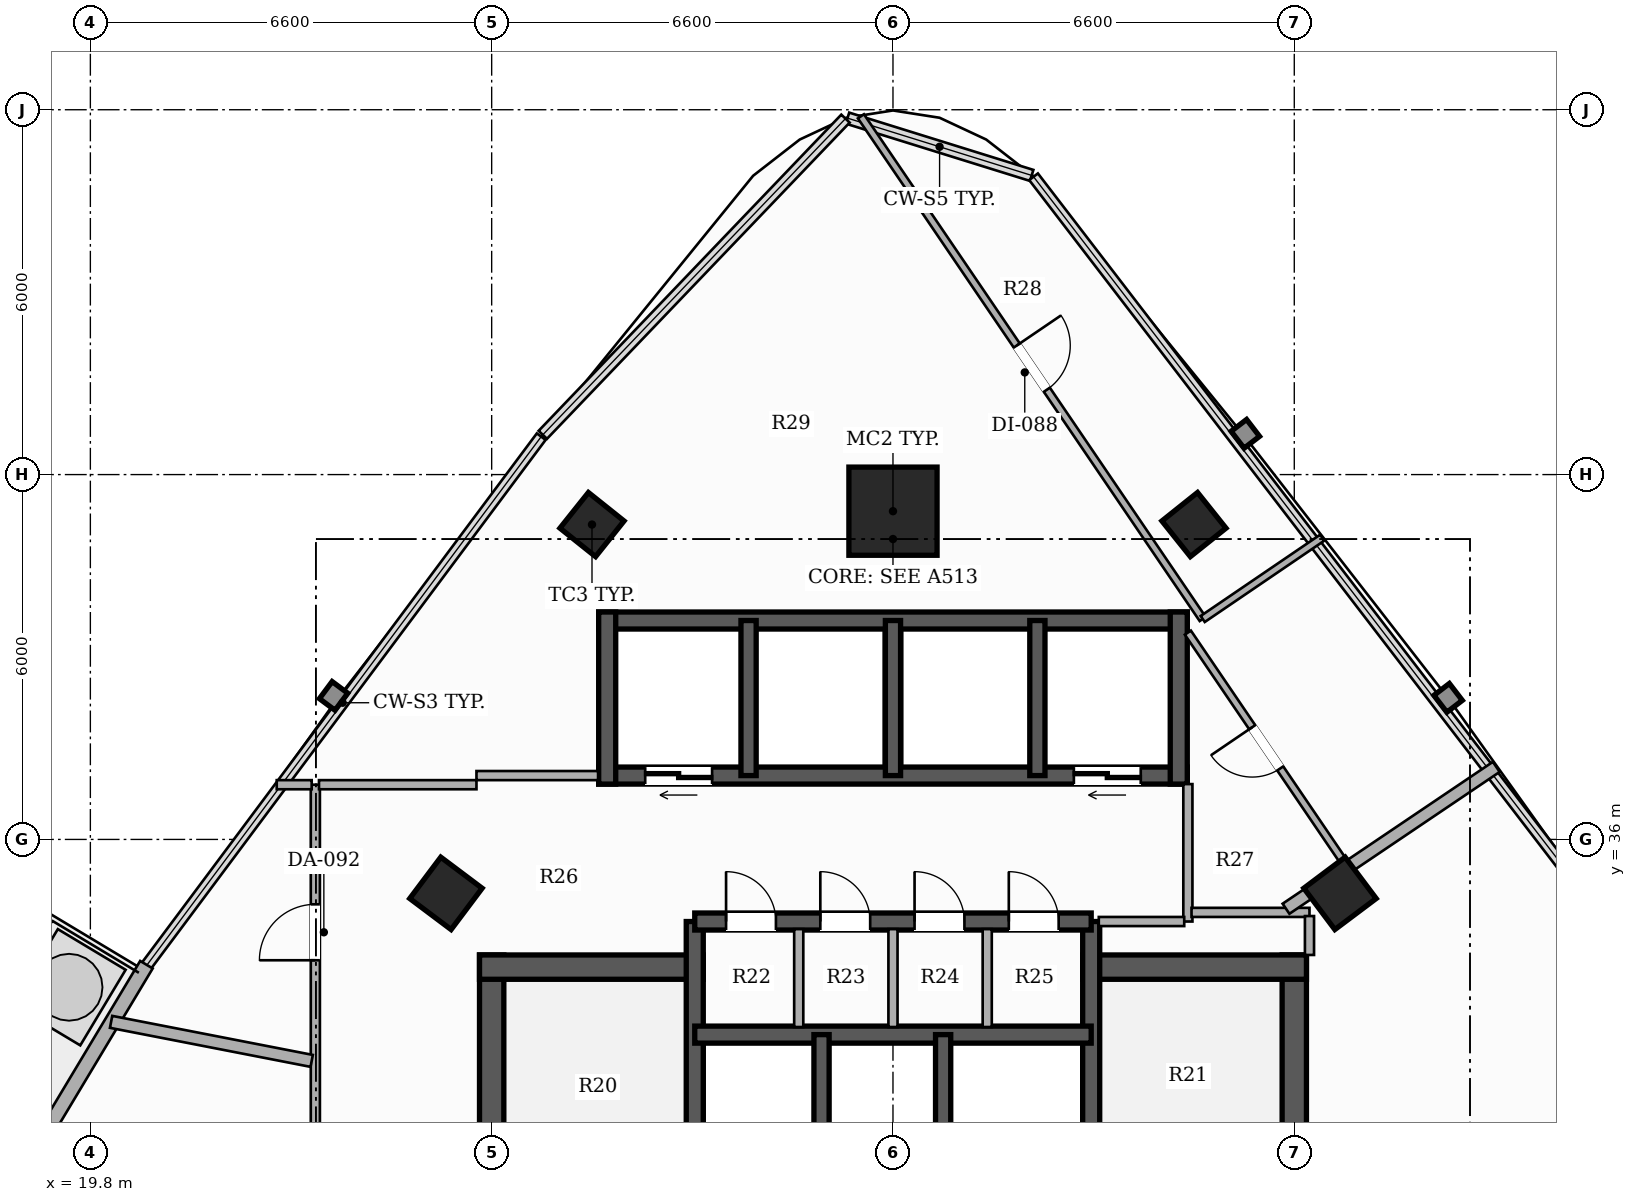
"""IFC4 building model, lengths in metres.
Left out: names, types, materials, properties, quantities, classifications, styles, units other than length and angle.
Written with IfcOpenShell. Run it as: python <this file> out.ifc"""

import sys

from ifc_helpers import new_model, si_unit, direction, frame, frame_2d, origin, origin_2d, place, context, subcontext, project, spatial, rectangle, hollow_rectangle, extrude, element, fill, save


model = new_model("IFC4")
c1 = context("Model", 3, precision=1e-05, world=origin(), true_north=direction((0.0, 1.0)))
c2 = subcontext(c1, "Body", "Model", "MODEL_VIEW")
j1 = project(units=[si_unit("LENGTHUNIT", "METRE"), si_unit("PLANEANGLEUNIT", "RADIAN")], contexts=[c1])
p1 = place(None, origin())
s1 = spatial("IfcSite", under=j1, at=p1, CompositionType="ELEMENT")
p2 = place(p1, origin())
s2 = spatial("IfcBuilding", under=s1, at=p2, CompositionType="ELEMENT")
p3 = place(p2, frame((0.0, 0.0, 160.55)))
s3 = spatial("IfcBuildingStorey", under=s2, at=p3, CompositionType="ELEMENT", Elevation=160.55)
p4 = place(p3, frame((26.4, 26.5, 0.0), z_axis=(0.0, 0.0, 1.0), x_axis=(0.0, 1.0, 0.0)))
e1 = element("IfcWall", 1, at=p4, inside=s3, PredefinedType="SHEAR", context=c2, shape_type="SweptSolid", body=[
    extrude(rectangle(XDim=7.6, YDim=0.4, at=frame_2d((3.8, 0.0))), origin(), (0.0, 0.0, 1.0), 3.3),
])
p5 = place(p3, frame((26.2, 33.9, 0.0), z_axis=(0.0, 0.0, 1.0), x_axis=(1.0, 0.0, 0.0)))
e2 = element("IfcWall", 2, at=p5, inside=s3, PredefinedType="SHEAR", context=c2, shape_type="SweptSolid", body=[
    extrude(rectangle(XDim=3.68, YDim=0.4, at=frame_2d((1.84, 0.0))), origin(), (0.0, 0.0, 1.0), 3.3),
])
p6 = place(p3, frame((39.6, 26.5, 0.0), z_axis=(0.0, 0.0, 1.0), x_axis=(0.0, 1.0, 0.0)))
e3 = element("IfcWall", 3, at=p6, inside=s3, PredefinedType="SHEAR", context=c2, shape_type="SweptSolid", body=[
    extrude(rectangle(XDim=7.6, YDim=0.4, at=frame_2d((3.8, 0.0))), origin(), (0.0, 0.0, 1.0), 3.3),
])
p7 = place(p3, frame((36.12, 33.9, 0.0), z_axis=(0.0, 0.0, 1.0), x_axis=(1.0, 0.0, 0.0)))
e4 = element("IfcWall", 4, at=p7, inside=s3, PredefinedType="SHEAR", context=c2, shape_type="SweptSolid", body=[
    extrude(rectangle(XDim=3.68, YDim=0.4, at=frame_2d((1.84, 0.0))), origin(), (0.0, 0.0, 1.0), 3.3),
])
p8 = place(p3, frame((29.74, 26.5, 0.0), z_axis=(0.0, 0.0, 1.0), x_axis=(0.0, 1.0, 0.0)))
e5 = element("IfcWall", 5, at=p8, inside=s3, PredefinedType="SHEAR", context=c2, shape_type="SweptSolid", body=[
    extrude(rectangle(XDim=8.15, YDim=0.28, at=frame_2d((4.075, 0.0))), origin(), (0.0, 0.0, 1.0), 3.3),
])
p9 = place(p8, frame((0.6, 0.0, 0.0)))
e6 = element("IfcOpeningElement", 6, at=p9, cuts=e5, PredefinedType="OPENING", context=c2, shape_type="SweptSolid", body=[
    extrude(rectangle(XDim=1.05, YDim=2.15, at=frame_2d((0.525, 1.075))), frame((0.0, 0.15, 0.0), z_axis=(0.0, -1.0, 0.0), x_axis=(1.0, 0.0, 0.0)), (0.0, 0.0, 1.0), 0.3),
])
p10 = place(p3, frame((36.26, 26.5, 0.0), z_axis=(0.0, 0.0, 1.0), x_axis=(0.0, 1.0, 0.0)))
e7 = element("IfcWall", 7, at=p10, inside=s3, PredefinedType="SHEAR", context=c2, shape_type="SweptSolid", body=[
    extrude(rectangle(XDim=8.15, YDim=0.28, at=frame_2d((4.075, 0.0))), origin(), (0.0, 0.0, 1.0), 3.3),
])
p11 = place(p10, frame((0.6, 0.0, 0.0)))
e8 = element("IfcOpeningElement", 8, at=p11, cuts=e7, PredefinedType="OPENING", context=c2, shape_type="SweptSolid", body=[
    extrude(rectangle(XDim=1.05, YDim=2.15, at=frame_2d((0.525, 1.075))), frame((0.0, 0.15, 0.0), z_axis=(0.0, -1.0, 0.0), x_axis=(1.0, 0.0, 0.0)), (0.0, 0.0, 1.0), 0.3),
])
p12 = place(p3, frame((29.74, 32.79, 0.0), z_axis=(0.0, 0.0, 1.0), x_axis=(1.0, 0.0, 0.0)))
e9 = element("IfcWall", 9, at=p12, inside=s3, PredefinedType="SHEAR", context=c2, shape_type="SweptSolid", body=[
    extrude(rectangle(XDim=6.52, YDim=0.28, at=frame_2d((3.26, 0.0))), origin(), (0.0, 0.0, 1.0), 3.3),
])
for number, where, z_axis, x_axis in (
    (10, (31.825, 29.89, 0.0), (0.0, 0.0, 1.0), (0.0, 1.0, 0.0)),
    (11, (33.825, 29.89, 0.0), (0.0, 0.0, 1.0), (0.0, 1.0, 0.0)),
):
    element("IfcWall", number, at=place(p3, frame(where, z_axis=z_axis, x_axis=x_axis)), inside=s3, PredefinedType="SHEAR", context=c2, shape_type="SweptSolid", body=[
        extrude(rectangle(XDim=2.9, YDim=0.25, at=frame_2d((1.45, 0.0))), origin(), (0.0, 0.0, 1.0), 3.3),
    ])
p13 = place(p3, frame((29.74, 34.65, 0.0), z_axis=(0.0, 0.0, 1.0), x_axis=(1.0, 0.0, 0.0)))
e12 = element("IfcWall", 12, at=p13, inside=s3, PredefinedType="SHEAR", context=c2, shape_type="SweptSolid", body=[
    extrude(rectangle(XDim=6.52, YDim=0.28, at=frame_2d((3.26, 0.0))), origin(), (0.0, 0.0, 1.0), 3.3),
])
p14 = place(p13, frame((0.515, 0.0, 0.0)))
e13 = element("IfcOpeningElement", 13, at=p14, cuts=e12, PredefinedType="OPENING", context=c2, shape_type="SweptSolid", body=[
    extrude(rectangle(XDim=0.82, YDim=2.1, at=frame_2d((0.41, 1.05))), frame((0.0, 0.15, 0.0), z_axis=(0.0, -1.0, 0.0), x_axis=(1.0, 0.0, 0.0)), (0.0, 0.0, 1.0), 0.3),
])
p15 = place(p13, frame((2.065, 0.0, 0.0)))
e14 = element("IfcOpeningElement", 14, at=p15, cuts=e12, PredefinedType="OPENING", context=c2, shape_type="SweptSolid", body=[
    extrude(rectangle(XDim=0.82, YDim=2.1, at=frame_2d((0.41, 1.05))), frame((0.0, 0.15, 0.0), z_axis=(0.0, -1.0, 0.0), x_axis=(1.0, 0.0, 0.0)), (0.0, 0.0, 1.0), 0.3),
])
p16 = place(p13, frame((3.615, 0.0, 0.0)))
e15 = element("IfcOpeningElement", 15, at=p16, cuts=e12, PredefinedType="OPENING", context=c2, shape_type="SweptSolid", body=[
    extrude(rectangle(XDim=0.82, YDim=2.1, at=frame_2d((0.41, 1.05))), frame((0.0, 0.15, 0.0), z_axis=(0.0, -1.0, 0.0), x_axis=(1.0, 0.0, 0.0)), (0.0, 0.0, 1.0), 0.3),
])
p17 = place(p13, frame((5.165, 0.0, 0.0)))
e16 = element("IfcOpeningElement", 16, at=p17, cuts=e12, PredefinedType="OPENING", context=c2, shape_type="SweptSolid", body=[
    extrude(rectangle(XDim=0.82, YDim=2.1, at=frame_2d((0.41, 1.05))), frame((0.0, 0.15, 0.0), z_axis=(0.0, -1.0, 0.0), x_axis=(1.0, 0.0, 0.0)), (0.0, 0.0, 1.0), 0.3),
])
p18 = place(p3, frame((37.84, 37.05, 0.0), z_axis=(0.0, 0.0, 1.0), x_axis=(-1.0, 0.0, 0.0)))
e17 = element("IfcWall", 17, at=p18, inside=s3, PredefinedType="SHEAR", context=c2, shape_type="SweptSolid", body=[
    extrude(rectangle(XDim=9.68, YDim=0.28, at=frame_2d((4.84, 0.0))), origin(), (0.0, 0.0, 1.0), 3.3),
])
p19 = place(p18, frame((7.815, 0.0, 0.0)))
e18 = element("IfcOpeningElement", 18, at=p19, cuts=e17, PredefinedType="OPENING", context=c2, shape_type="SweptSolid", body=[
    extrude(rectangle(XDim=1.1, YDim=2.2, at=frame_2d((0.55, 1.1))), frame((0.0, 0.15, 0.0), z_axis=(0.0, -1.0, 0.0), x_axis=(1.0, 0.0, 0.0)), (0.0, 0.0, 1.0), 0.3),
])
p20 = place(p18, frame((0.765, 0.0, 0.0)))
e19 = element("IfcOpeningElement", 19, at=p20, cuts=e17, PredefinedType="OPENING", context=c2, shape_type="SweptSolid", body=[
    extrude(rectangle(XDim=1.1, YDim=2.2, at=frame_2d((0.55, 1.1))), frame((0.0, 0.15, 0.0), z_axis=(0.0, -1.0, 0.0), x_axis=(1.0, 0.0, 0.0)), (0.0, 0.0, 1.0), 0.3),
])
p21 = place(p3, frame((28.16, 39.6, 0.0), z_axis=(0.0, 0.0, 1.0), x_axis=(1.0, 0.0, 0.0)))
e20 = element("IfcWall", 20, at=p21, inside=s3, PredefinedType="SHEAR", context=c2, shape_type="SweptSolid", body=[
    extrude(rectangle(XDim=9.68, YDim=0.28, at=frame_2d((4.84, 0.0))), origin(), (0.0, 0.0, 1.0), 3.3),
])
for number, where, z_axis, x_axis in (
    (21, (28.3, 36.91, 0.0), (0.0, 0.0, 1.0), (0.0, 1.0, 0.0)),
    (22, (37.7, 36.91, 0.0), (0.0, 0.0, 1.0), (0.0, 1.0, 0.0)),
):
    element("IfcWall", number, at=place(p3, frame(where, z_axis=z_axis, x_axis=x_axis)), inside=s3, PredefinedType="SHEAR", context=c2, shape_type="SweptSolid", body=[
        extrude(rectangle(XDim=2.83, YDim=0.28, at=frame_2d((1.415, 0.0))), origin(), (0.0, 0.0, 1.0), 3.3),
    ])
for number, where, z_axis, x_axis in (
    (23, (30.625, 37.05, 0.0), (0.0, 0.0, 1.0), (0.0, 1.0, 0.0)),
    (24, (33.0, 37.05, 0.0), (0.0, 0.0, 1.0), (0.0, 1.0, 0.0)),
    (25, (35.375, 37.05, 0.0), (0.0, 0.0, 1.0), (0.0, 1.0, 0.0)),
):
    element("IfcWall", number, at=place(p3, frame(where, z_axis=z_axis, x_axis=x_axis)), inside=s3, PredefinedType="SHEAR", context=c2, shape_type="SweptSolid", body=[
        extrude(rectangle(XDim=2.55, YDim=0.25, at=frame_2d((1.275, 0.0))), origin(), (0.0, 0.0, 1.0), 3.3),
    ])
p22 = place(p3, frame((33.0, 41.398, 0.0), z_axis=(0.0, 0.0, 1.0), x_axis=(1.0, 0.0, 0.0)))
e26 = element("IfcColumn", 26, at=p22, inside=s3, PredefinedType="COLUMN", context=c2, shape_type="SweptSolid", body=[
    extrude(hollow_rectangle(XDim=1.45, YDim=1.45, WallThickness=0.045, at=origin_2d()), origin(), (0.0, 0.0, 1.0), 3.3),
])
for number, where, z_axis, x_axis in (
    (27, (25.648, 35.113, 0.0), (0.0, 0.0, 1.0), (0.6, 0.8, 0.0)),
    (28, (40.352, 35.113, 0.0), (0.0, 0.0, 1.0), (-0.6, 0.8, 0.0)),
):
    element("IfcColumn", number, at=place(p3, frame(where, z_axis=z_axis, x_axis=x_axis)), inside=s3, PredefinedType="COLUMN", context=c2, shape_type="SweptSolid", body=[
        extrude(hollow_rectangle(XDim=0.85, YDim=0.85, WallThickness=0.028, at=origin_2d()), origin(), (0.0, 0.0, 1.0), 3.3),
    ])
for number, where, z_axis, x_axis in (
    (29, (28.05, 41.178, 0.0), (0.0, 0.0, 1.0), (0.624, 0.782, 0.0)),
    (30, (37.95, 41.178, 0.0), (0.0, 0.0, 1.0), (-0.624, 0.782, 0.0)),
):
    element("IfcColumn", number, at=place(p3, frame(where, z_axis=z_axis, x_axis=x_axis)), inside=s3, PredefinedType="COLUMN", context=c2, shape_type="SweptSolid", body=[
        extrude(hollow_rectangle(XDim=0.75, YDim=0.75, WallThickness=0.025, at=origin_2d()), origin(), (0.0, 0.0, 1.0), 3.3),
    ])
p23 = place(p3, frame((20.722, 33.94, 0.0), z_axis=(0.0, 0.0, 1.0), x_axis=(-0.514334017412, -0.85758994778, 0.0)))
e31 = element("IfcWall", 31, at=p23, inside=s3, PredefinedType="SOLIDWALL", context=c2, shape_type="SweptSolid", body=[
    extrude(rectangle(XDim=11.1, YDim=0.24, at=frame_2d((5.55, 0.0))), origin(), (0.0, 0.0, 1.0), 2.624),
])
p24 = place(p23, frame((8.602, 0.0, 0.0)))
e32 = element("IfcOpeningElement", 32, at=p24, cuts=e31, PredefinedType="OPENING", context=c2, shape_type="SweptSolid", body=[
    extrude(rectangle(XDim=1.8, YDim=2.2, at=frame_2d((0.9, 1.1))), frame((0.0, 0.13, 0.0), z_axis=(0.0, -1.0, 0.0), x_axis=(1.0, 0.0, 0.0)), (0.0, 0.0, 1.0), 0.26),
])
p25 = place(p3, frame((37.85, 34.65, 0.0), z_axis=(0.0, 0.0, 1.0), x_axis=(0.0, 1.0, 0.0)))
e33 = element("IfcWall", 33, at=p25, inside=s3, PredefinedType="PARTITIONING", context=c2, shape_type="SweptSolid", body=[
    extrude(rectangle(XDim=2.26, YDim=0.15, at=frame_2d((1.13, 0.0))), origin(), (0.0, 0.0, 1.0), 3.06),
])
p26 = place(p3, frame((36.385, 34.65, 0.0), z_axis=(0.0, 0.0, 1.0), x_axis=(1.0, 0.0, 0.0)))
e34 = element("IfcWall", 34, at=p26, inside=s3, PredefinedType="PARTITIONING", context=c2, shape_type="SweptSolid", body=[
    extrude(rectangle(XDim=1.405, YDim=0.15, at=frame_2d((0.703, 0.0))), origin(), (0.0, 0.0, 1.0), 2.425),
])
for number, where, z_axis, x_axis in (
    (35, (31.45, 32.915, 0.0), (0.0, 0.0, 1.0), (0.0, 1.0, 0.0)),
    (36, (33.0, 32.915, 0.0), (0.0, 0.0, 1.0), (0.0, 1.0, 0.0)),
    (37, (34.55, 32.915, 0.0), (0.0, 0.0, 1.0), (0.0, 1.0, 0.0)),
):
    element("IfcWall", number, at=place(p3, frame(where, z_axis=z_axis, x_axis=x_axis)), inside=s3, PredefinedType="PARTITIONING", context=c2, shape_type="SweptSolid", body=[
        extrude(rectangle(XDim=1.61, YDim=0.15, at=frame_2d((0.805, 0.0))), origin(), (0.0, 0.0, 1.0), 3.06),
    ])
p27 = place(p3, frame((23.5, 14.06, 0.0), z_axis=(0.0, 0.0, 1.0), x_axis=(0.0, 1.0, 0.0)))
e38 = element("IfcWall", 38, at=p27, inside=s3, PredefinedType="PARTITIONING", context=c2, shape_type="SweptSolid", body=[
    extrude(rectangle(XDim=22.84, YDim=0.15, at=frame_2d((11.42, 0.0))), origin(), (0.0, 0.0, 1.0), 2.413),
])
p28 = place(p27, frame((4.064, 0.0, 0.0)))
e39 = element("IfcOpeningElement", 39, at=p28, cuts=e38, PredefinedType="OPENING", context=c2, shape_type="SweptSolid", body=[
    extrude(rectangle(XDim=0.92, YDim=2.15, at=frame_2d((0.46, 1.075))), frame((0.0, 0.085, 0.0), z_axis=(0.0, -1.0, 0.0), x_axis=(1.0, 0.0, 0.0)), (0.0, 0.0, 1.0), 0.17),
])
p29 = place(p27, frame((13.047, 0.0, 0.0)))
e40 = element("IfcOpeningElement", 40, at=p29, cuts=e38, PredefinedType="OPENING", context=c2, shape_type="SweptSolid", body=[
    extrude(rectangle(XDim=0.88, YDim=2.1, at=frame_2d((0.44, 1.05))), frame((0.0, 0.085, 0.0), z_axis=(0.0, -1.0, 0.0), x_axis=(1.0, 0.0, 0.0)), (0.0, 0.0, 1.0), 0.17),
])
p30 = place(p27, frame((19.953, 0.0, 0.0)))
e41 = element("IfcOpeningElement", 41, at=p30, cuts=e38, PredefinedType="OPENING", context=c2, shape_type="SweptSolid", body=[
    extrude(rectangle(XDim=0.92, YDim=2.15, at=frame_2d((0.46, 1.075))), frame((0.0, 0.085, 0.0), z_axis=(0.0, -1.0, 0.0), x_axis=(1.0, 0.0, 0.0)), (0.0, 0.0, 1.0), 0.17),
])
p31 = place(p3, frame((22.865, 36.9, 0.0), z_axis=(0.0, 0.0, 1.0), x_axis=(1.0, 0.0, 0.0)))
e42 = element("IfcWall", 42, at=p31, inside=s3, PredefinedType="PARTITIONING", context=c2, shape_type="SweptSolid", body=[
    extrude(rectangle(XDim=0.575, YDim=0.15, at=frame_2d((0.288, 0.0))), origin(), (0.0, 0.0, 1.0), 3.06),
])
p32 = place(p3, frame((23.56, 36.9, 0.0), z_axis=(0.0, 0.0, 1.0), x_axis=(1.0, 0.0, 0.0)))
e43 = element("IfcWall", 43, at=p32, inside=s3, PredefinedType="PARTITIONING", context=c2, shape_type="SweptSolid", body=[
    extrude(rectangle(XDim=2.59, YDim=0.15, at=frame_2d((1.295, 0.0))), origin(), (0.0, 0.0, 1.0), 2.413),
])
p33 = place(p3, frame((26.15, 37.05, 0.0), z_axis=(0.0, 0.0, 1.0), x_axis=(1.0, 0.0, 0.0)))
e44 = element("IfcWall", 44, at=p33, inside=s3, PredefinedType="PARTITIONING", context=c2, shape_type="SweptSolid", body=[
    extrude(rectangle(XDim=2.0, YDim=0.15, at=frame_2d((1.0, 0.0))), origin(), (0.0, 0.0, 1.0), 2.413),
])
p34 = place(p3, frame((37.91, 34.8, 0.0), z_axis=(0.0, 0.0, 1.0), x_axis=(1.0, 0.0, 0.0)))
e45 = element("IfcWall", 45, at=p34, inside=s3, PredefinedType="PARTITIONING", context=c2, shape_type="SweptSolid", body=[
    extrude(rectangle(XDim=1.94, YDim=0.15, at=frame_2d((0.97, 0.0))), origin(), (0.0, 0.0, 1.0), 2.721),
])
p35 = place(p3, frame((39.85, 34.74, 0.0), z_axis=(0.0, 0.0, 1.0), x_axis=(0.0, -1.0, 0.0)))
e46 = element("IfcWall", 46, at=p35, inside=s3, PredefinedType="PARTITIONING", context=c2, shape_type="SweptSolid", body=[
    extrude(rectangle(XDim=0.64, YDim=0.15, at=frame_2d((0.32, 0.0))), origin(), (0.0, 0.0, 1.0), 2.721),
])
p36 = place(p3, frame((39.464, 34.86, 0.0), z_axis=(0.0, 0.0, 1.0), x_axis=(0.828976210701, 0.559283865395, 0.0)))
e47 = element("IfcWall", 47, at=p36, inside=s3, PredefinedType="PARTITIONING", context=c2, shape_type="SweptSolid", body=[
    extrude(rectangle(XDim=4.171, YDim=0.2, at=frame_2d((2.086, 0.0))), origin(), (0.0, 0.0, 1.0), 2.413),
])
p37 = place(p3, frame((20.141, 33.0, 0.0), z_axis=(0.0, 0.0, 1.0), x_axis=(0.981579076432, -0.191056318163, 0.0)))
e48 = element("IfcWall", 48, at=p37, inside=s3, PredefinedType="PARTITIONING", context=c2, shape_type="SweptSolid", body=[
    extrude(rectangle(XDim=3.361, YDim=0.2, at=frame_2d((1.68, 0.0))), origin(), (0.0, 0.0, 1.0), 2.413),
])
p38 = place(p3, frame((40.427, 35.612, 0.0), z_axis=(0.0, 0.0, 1.0), x_axis=(-0.562385802303, 0.826874965982, 0.0)))
e49 = element("IfcWall", 49, at=p38, inside=s3, PredefinedType="PARTITIONING", context=c2, shape_type="SweptSolid", body=[
    extrude(rectangle(XDim=4.582, YDim=0.12, at=frame_2d((2.291, 0.0))), origin(), (0.0, 0.0, 1.0), 2.413),
])
p39 = place(p38, frame((1.881, 0.0, 0.0)))
e50 = element("IfcOpeningElement", 50, at=p39, cuts=e49, PredefinedType="OPENING", context=c2, shape_type="SweptSolid", body=[
    extrude(rectangle(XDim=0.82, YDim=2.1, at=frame_2d((0.41, 1.05))), frame((0.0, 0.07, 0.0), z_axis=(0.0, -1.0, 0.0), x_axis=(1.0, 0.0, 0.0)), (0.0, 0.0, 1.0), 0.14),
])
p40 = place(p3, frame((32.473, 47.892, 0.0), z_axis=(0.0, 0.0, 1.0), x_axis=(0.562273950157, -0.826951029369, 0.0)))
e51 = element("IfcWall", 51, at=p40, inside=s3, PredefinedType="PARTITIONING", context=c2, shape_type="SweptSolid", body=[
    extrude(rectangle(XDim=9.997, YDim=0.12, at=frame_2d((4.999, 0.0))), origin(), (0.0, 0.0, 1.0), 2.413),
])
p41 = place(p40, frame((4.558, 0.0, 0.0)))
e52 = element("IfcOpeningElement", 52, at=p41, cuts=e51, PredefinedType="OPENING", context=c2, shape_type="SweptSolid", body=[
    extrude(rectangle(XDim=0.88, YDim=2.1, at=frame_2d((0.44, 1.05))), frame((0.0, 0.07, 0.0), z_axis=(0.0, -1.0, 0.0), x_axis=(1.0, 0.0, 0.0)), (0.0, 0.0, 1.0), 0.14),
])
p42 = place(p3, frame((38.094, 39.625, 0.0), z_axis=(0.0, 0.0, 1.0), x_axis=(0.826798473187, 0.562498253096, 0.0)))
e53 = element("IfcWall", 53, at=p42, inside=s3, PredefinedType="PARTITIONING", context=c2, shape_type="SweptSolid", body=[
    extrude(rectangle(XDim=2.377, YDim=0.12, at=frame_2d((1.188, 0.0))), origin(), (0.0, 0.0, 1.0), 2.413),
])
p43 = place(p19, origin())
e54 = element("IfcDoor", 54, at=p43, inside=s3, OperationType="DOUBLE_DOOR_SLIDING", PredefinedType="DOOR", context=c2, shape_type="SweptSolid", body=[
    extrude(rectangle(XDim=1.1, YDim=2.2, at=frame_2d((0.55, 1.1))), frame((0.0, 0.025, 0.0), z_axis=(0.0, -1.0, 0.0), x_axis=(1.0, 0.0, 0.0)), (0.0, 0.0, 1.0), 0.05),
])
fill(e18, e54)
p44 = place(p20, origin())
e55 = element("IfcDoor", 55, at=p44, inside=s3, OperationType="DOUBLE_DOOR_SLIDING", PredefinedType="DOOR", context=c2, shape_type="SweptSolid", body=[
    extrude(rectangle(XDim=1.1, YDim=2.2, at=frame_2d((0.55, 1.1))), frame((0.0, 0.025, 0.0), z_axis=(0.0, -1.0, 0.0), x_axis=(1.0, 0.0, 0.0)), (0.0, 0.0, 1.0), 0.05),
])
fill(e19, e55)
p45 = place(p14, origin())
e56 = element("IfcDoor", 56, at=p45, inside=s3, OperationType="SINGLE_SWING_LEFT", PredefinedType="DOOR", context=c2, shape_type="SweptSolid", body=[
    extrude(rectangle(XDim=0.82, YDim=2.1, at=frame_2d((0.41, 1.05))), frame((0.0, 0.025, 0.0), z_axis=(0.0, -1.0, 0.0), x_axis=(1.0, 0.0, 0.0)), (0.0, 0.0, 1.0), 0.05),
])
fill(e13, e56)
p46 = place(p15, origin())
e57 = element("IfcDoor", 57, at=p46, inside=s3, OperationType="SINGLE_SWING_LEFT", PredefinedType="DOOR", context=c2, shape_type="SweptSolid", body=[
    extrude(rectangle(XDim=0.82, YDim=2.1, at=frame_2d((0.41, 1.05))), frame((0.0, 0.025, 0.0), z_axis=(0.0, -1.0, 0.0), x_axis=(1.0, 0.0, 0.0)), (0.0, 0.0, 1.0), 0.05),
])
fill(e14, e57)
p47 = place(p16, origin())
e58 = element("IfcDoor", 58, at=p47, inside=s3, OperationType="SINGLE_SWING_LEFT", PredefinedType="DOOR", context=c2, shape_type="SweptSolid", body=[
    extrude(rectangle(XDim=0.82, YDim=2.1, at=frame_2d((0.41, 1.05))), frame((0.0, 0.025, 0.0), z_axis=(0.0, -1.0, 0.0), x_axis=(1.0, 0.0, 0.0)), (0.0, 0.0, 1.0), 0.05),
])
fill(e15, e58)
p48 = place(p17, origin())
e59 = element("IfcDoor", 59, at=p48, inside=s3, OperationType="SINGLE_SWING_LEFT", PredefinedType="DOOR", context=c2, shape_type="SweptSolid", body=[
    extrude(rectangle(XDim=0.82, YDim=2.1, at=frame_2d((0.41, 1.05))), frame((0.0, 0.025, 0.0), z_axis=(0.0, -1.0, 0.0), x_axis=(1.0, 0.0, 0.0)), (0.0, 0.0, 1.0), 0.05),
])
fill(e16, e59)
p49 = place(p30, origin())
e60 = element("IfcDoor", 60, at=p49, inside=s3, OperationType="SINGLE_SWING_LEFT", PredefinedType="DOOR", context=c2, shape_type="SweptSolid", body=[
    extrude(rectangle(XDim=0.92, YDim=2.15, at=frame_2d((0.46, 1.075))), frame((0.0, 0.025, 0.0), z_axis=(0.0, -1.0, 0.0), x_axis=(1.0, 0.0, 0.0)), (0.0, 0.0, 1.0), 0.05),
])
fill(e41, e60)
p50 = place(p39, origin())
e61 = element("IfcDoor", 61, at=p50, inside=s3, OperationType="SINGLE_SWING_RIGHT", PredefinedType="DOOR", context=c2, shape_type="SweptSolid", body=[
    extrude(rectangle(XDim=0.82, YDim=2.1, at=frame_2d((0.41, 1.05))), frame((0.0, 0.025, 0.0), z_axis=(0.0, -1.0, 0.0), x_axis=(1.0, 0.0, 0.0)), (0.0, 0.0, 1.0), 0.05),
])
fill(e50, e61)
p51 = place(p41, origin())
e62 = element("IfcDoor", 62, at=p51, inside=s3, OperationType="SINGLE_SWING_LEFT", PredefinedType="DOOR", context=c2, shape_type="SweptSolid", body=[
    extrude(rectangle(XDim=0.88, YDim=2.1, at=frame_2d((0.44, 1.05))), frame((0.0, 0.025, 0.0), z_axis=(0.0, -1.0, 0.0), x_axis=(1.0, 0.0, 0.0)), (0.0, 0.0, 1.0), 0.05),
])
fill(e52, e62)
save(model, sys.argv[1])
